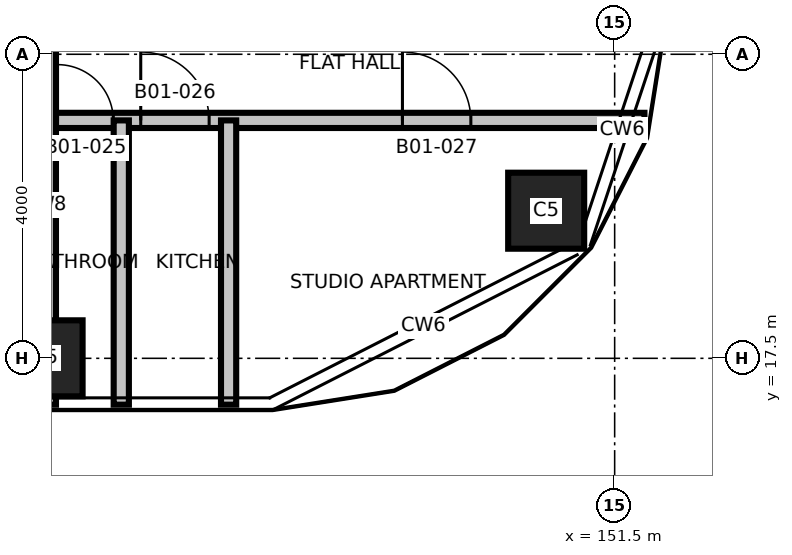
"""IFC4 building model, lengths in metres.
Left out: names, types, materials, properties, quantities, classifications, styles, units other than length and angle.
Written with IfcOpenShell. Run it as: python <this file> out.ifc"""

import sys

from ifc_helpers import new_model, si_unit, direction, frame, frame_2d, origin, origin_2d, place, context, subcontext, project, spatial, rectangle, extrude, element, fill, save


model = new_model("IFC4")
c1 = context("Model", 3, precision=1e-05, world=origin(), true_north=direction((0.0, 1.0)))
c2 = subcontext(c1, "Body", "Model", "MODEL_VIEW")
j1 = project(units=[si_unit("LENGTHUNIT", "METRE"), si_unit("PLANEANGLEUNIT", "RADIAN")], contexts=[c1])
p1 = place(None, origin())
s1 = spatial("IfcSite", under=j1, at=p1, CompositionType="ELEMENT")
p2 = place(p1, origin())
s2 = spatial("IfcBuilding", under=s1, at=p2, CompositionType="ELEMENT")
p3 = place(p2, frame((0.0, 0.0, 33.5)))
s3 = spatial("IfcBuildingStorey", under=s2, at=p3, CompositionType="ELEMENT", Elevation=33.5)
for number, where, z_axis, x_axis in (
    (1, (144.0, 17.5, 0.0), (0.0, 0.0, 1.0), (1.0, 0.0, 0.0)),
    (2, (150.599, 19.442, 0.0), (0.0, 0.0, 1.0), (1.0, 0.0, 0.0)),
):
    element("IfcColumn", number, at=place(p3, frame(where, z_axis=z_axis, x_axis=x_axis)), inside=s3, PredefinedType="COLUMN", context=c2, shape_type="SweptSolid", body=[
        extrude(rectangle(XDim=1.0, YDim=1.0, at=origin_2d()), origin(), (0.0, 0.0, 1.0), 3.7),
    ])
p4 = place(p3, frame((144.0, 20.63, 0.0), z_axis=(0.0, 0.0, 1.0), x_axis=(1.0, 0.0, 0.0)))
e3 = element("IfcWall", 3, at=p4, inside=s3, PredefinedType="PARTITIONING", context=c2, shape_type="SweptSolid", body=[
    extrude(rectangle(XDim=7.892, YDim=0.2, at=frame_2d((3.946, 0.0))), origin(), (0.0, 0.0, 1.0), 3.4),
])
p5 = place(p4, frame((0.17, 0.0, 0.0)))
e4 = element("IfcOpeningElement", 4, at=p5, cuts=e3, PredefinedType="OPENING", context=c2, shape_type="SweptSolid", body=[
    extrude(rectangle(XDim=0.734, YDim=2.1, at=frame_2d((0.367, 1.05))), frame((0.0, 0.11, 0.0), z_axis=(0.0, -1.0, 0.0), x_axis=(1.0, 0.0, 0.0)), (0.0, 0.0, 1.0), 0.22),
])
p6 = place(p4, frame((1.265, 0.0, 0.0)))
e5 = element("IfcOpeningElement", 5, at=p6, cuts=e3, PredefinedType="OPENING", context=c2, shape_type="SweptSolid", body=[
    extrude(rectangle(XDim=0.9, YDim=2.1, at=frame_2d((0.45, 1.05))), frame((0.0, 0.11, 0.0), z_axis=(0.0, -1.0, 0.0), x_axis=(1.0, 0.0, 0.0)), (0.0, 0.0, 1.0), 0.22),
])
p7 = place(p4, frame((4.708, 0.0, 0.0)))
e6 = element("IfcOpeningElement", 6, at=p7, cuts=e3, PredefinedType="OPENING", context=c2, shape_type="SweptSolid", body=[
    extrude(rectangle(XDim=0.9, YDim=2.1, at=frame_2d((0.45, 1.05))), frame((0.0, 0.11, 0.0), z_axis=(0.0, -1.0, 0.0), x_axis=(1.0, 0.0, 0.0)), (0.0, 0.0, 1.0), 0.22),
])
p8 = place(p3, frame((144.0, 16.89, 0.0), z_axis=(0.0, 0.0, 1.0), x_axis=(0.0, 1.0, 0.0)))
e7 = element("IfcWall", 7, at=p8, inside=s3, PredefinedType="SHEAR", context=c2, shape_type="SweptSolid", body=[
    extrude(rectangle(XDim=5.26, YDim=0.3, at=frame_2d((2.63, 0.0))), origin(), (0.0, 0.0, 1.0), 3.4),
])
for number, where, z_axis, x_axis in (
    (8, (145.009, 16.89, 0.0), (0.0, 0.0, 1.0), (0.0, 1.0, 0.0)),
    (9, (146.421, 16.89, 0.0), (0.0, 0.0, 1.0), (0.0, 1.0, 0.0)),
):
    element("IfcWall", number, at=place(p3, frame(where, z_axis=z_axis, x_axis=x_axis)), inside=s3, PredefinedType="PARTITIONING", context=c2, shape_type="SweptSolid", body=[
        extrude(rectangle(XDim=3.74, YDim=0.2, at=frame_2d((1.87, 0.0))), origin(), (0.0, 0.0, 1.0), 3.4),
    ])
p9 = place(p5, origin())
e10 = element("IfcDoor", 10, at=p9, inside=s3, OperationType="SINGLE_SWING_LEFT", PredefinedType="DOOR", context=c2, shape_type="SweptSolid", body=[
    extrude(rectangle(XDim=0.734, YDim=2.1, at=frame_2d((0.367, 1.05))), frame((0.0, 0.025, 0.0), z_axis=(0.0, -1.0, 0.0), x_axis=(1.0, 0.0, 0.0)), (0.0, 0.0, 1.0), 0.05),
])
fill(e4, e10)
p10 = place(p6, origin())
e11 = element("IfcDoor", 11, at=p10, inside=s3, OperationType="SINGLE_SWING_RIGHT", PredefinedType="DOOR", context=c2, shape_type="SweptSolid", body=[
    extrude(rectangle(XDim=0.9, YDim=2.1, at=frame_2d((0.45, 1.05))), frame((0.0, 0.025, 0.0), z_axis=(0.0, -1.0, 0.0), x_axis=(1.0, 0.0, 0.0)), (0.0, 0.0, 1.0), 0.05),
])
fill(e5, e11)
p11 = place(p7, origin())
e12 = element("IfcDoor", 12, at=p11, inside=s3, OperationType="SINGLE_SWING_LEFT", PredefinedType="DOOR", context=c2, shape_type="SweptSolid", body=[
    extrude(rectangle(XDim=0.9, YDim=2.1, at=frame_2d((0.45, 1.05))), frame((0.0, 0.025, 0.0), z_axis=(0.0, -1.0, 0.0), x_axis=(1.0, 0.0, 0.0)), (0.0, 0.0, 1.0), 0.05),
])
fill(e6, e12)
save(model, sys.argv[1])
